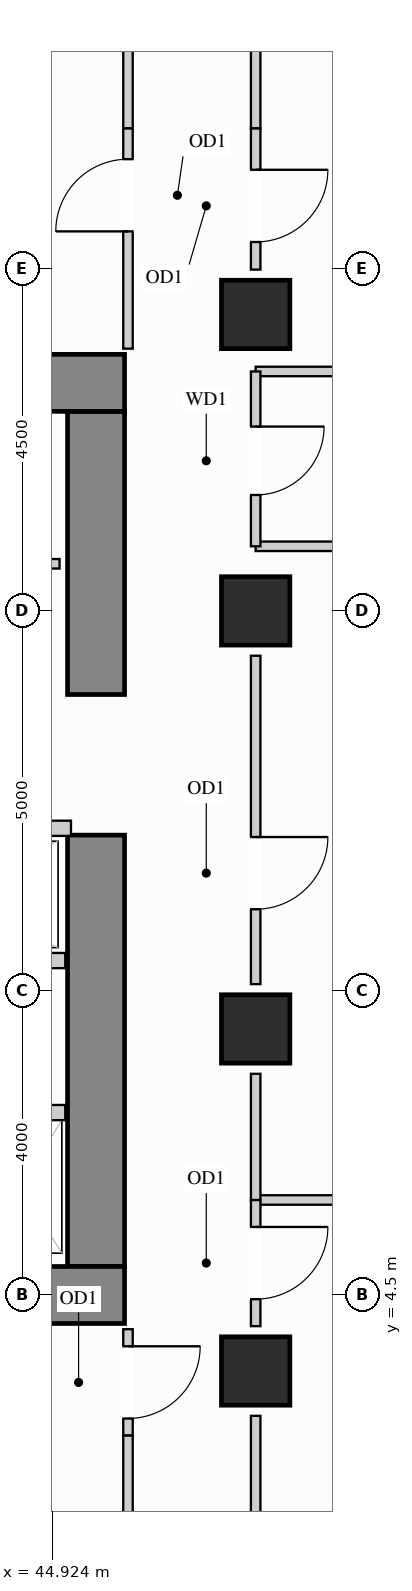
"""IFC4 building model, lengths in metres.
Left out: names, types, materials, properties, quantities, classifications, styles, units other than length and angle.
Written with IfcOpenShell. Run it as: python <this file> out.ifc"""

import sys

from ifc_helpers import new_model, si_unit, direction, frame, frame_2d, origin, origin_2d, place, context, subcontext, project, spatial, rectangle, extrude, source, transform, mapped, element, fill, save


model = new_model("IFC4")
c1 = context("Model", 3, precision=1e-05, world=origin(), true_north=direction((0.0, 1.0)))
c2 = subcontext(c1, "Body", "Model", "MODEL_VIEW")
j1 = project(units=[si_unit("LENGTHUNIT", "METRE"), si_unit("PLANEANGLEUNIT", "RADIAN")], contexts=[c1])
p1 = place(None, origin())
s1 = spatial("IfcSite", under=j1, at=p1, CompositionType="ELEMENT")
p2 = place(p1, origin())
s2 = spatial("IfcBuilding", under=s1, at=p2, CompositionType="ELEMENT")
p3 = place(p2, frame((0.0, 0.0, 135.0)))
s3 = spatial("IfcBuildingStorey", under=s2, at=p3, CompositionType="ELEMENT", Elevation=135.0)
m1 = source(origin(), c2, "Body", "SweptSolid", [
    extrude(rectangle(XDim=0.9, YDim=0.9, at=origin_2d()), origin(), (0.0, 0.0, 1.0), 3.32),
])
for number, where, z_axis, x_axis in (
    (1, (47.6, 13.5, 0.0), (0.0, 0.0, 1.0), (1.0, 0.0, 0.0)),
    (2, (47.6, 3.5, 0.0), (0.0, 0.0, 1.0), (1.0, 0.0, 0.0)),
    (3, (47.6, 8.0, 0.0), (0.0, 0.0, 1.0), (1.0, 0.0, 0.0)),
    (4, (47.6, 17.4, 0.0), (0.0, 0.0, 1.0), (1.0, 0.0, 0.0)),
):
    element("IfcColumn", number, at=place(p3, frame(where, z_axis=z_axis, x_axis=x_axis)), inside=s3, PredefinedType="COLUMN", context=c2, shape_type="MappedRepresentation", body=[
        mapped(m1, transform((0.0, 0.0, 0.0), x_axis=(1.0, 0.0, 0.0), y_axis=(0.0, 1.0, 0.0), z_axis=(0.0, 0.0, 1.0))),
    ])
m2 = source(origin(), c2, "Body", "SweptSolid", [
    extrude(rectangle(XDim=5.675, YDim=0.75, at=frame_2d((2.837, 0.0))), origin(), (0.0, 0.0, 1.0), 3.32),
])
p4 = place(p3, frame((45.5, 4.875, 0.0), z_axis=(0.0, 0.0, 1.0), x_axis=(0.0, 1.0, 0.0)))
e5 = element("IfcWall", 5, at=p4, inside=s3, PredefinedType="SHEAR", context=c2, shape_type="MappedRepresentation", body=[
    mapped(m2, transform((0.0, 0.0, 0.0), x_axis=(1.0, 0.0, 0.0), y_axis=(0.0, 1.0, 0.0), z_axis=(0.0, 0.0, 1.0))),
])
m3 = source(origin(), c2, "Body", "SweptSolid", [
    extrude(rectangle(XDim=3.725, YDim=0.75, at=frame_2d((1.863, 0.0))), origin(), (0.0, 0.0, 1.0), 3.32),
])
p5 = place(p3, frame((45.5, 12.4, 0.0), z_axis=(0.0, 0.0, 1.0), x_axis=(0.0, 1.0, 0.0)))
e6 = element("IfcWall", 6, at=p5, inside=s3, PredefinedType="SHEAR", context=c2, shape_type="MappedRepresentation", body=[
    mapped(m3, transform((0.0, 0.0, 0.0), x_axis=(1.0, 0.0, 0.0), y_axis=(0.0, 1.0, 0.0), z_axis=(0.0, 0.0, 1.0))),
])
m4 = source(origin(), c2, "Body", "SweptSolid", [
    extrude(rectangle(XDim=10.25, YDim=0.75, at=frame_2d((5.125, 0.0))), origin(), (0.0, 0.0, 1.0), 3.32),
])
for number, where, z_axis, x_axis in (
    (7, (35.625, 16.5, 0.0), (0.0, 0.0, 1.0), (1.0, 0.0, 0.0)),
    (8, (35.625, 4.5, 0.0), (0.0, 0.0, 1.0), (1.0, 0.0, 0.0)),
):
    element("IfcWall", number, at=place(p3, frame(where, z_axis=z_axis, x_axis=x_axis)), inside=s3, PredefinedType="SHEAR", context=c2, shape_type="MappedRepresentation", body=[
        mapped(m4, transform((0.0, 0.0, 0.0), x_axis=(1.0, 0.0, 0.0), y_axis=(0.0, 1.0, 0.0), z_axis=(0.0, 0.0, 1.0))),
    ])
p6 = place(p3, frame((36.5, 14.12, 0.0), z_axis=(0.0, 0.0, 1.0), x_axis=(1.0, 0.0, 0.0)))
e9 = element("IfcWall", 9, at=p6, inside=s3, PredefinedType="PARTITIONING", context=c2, shape_type="SweptSolid", body=[
    extrude(rectangle(XDim=8.52, YDim=0.125, at=frame_2d((4.26, 0.0))), origin(), (0.0, 0.0, 1.0), 3.305),
])
p7 = place(p6, frame((3.785, 0.0, 0.0)))
e10 = element("IfcOpeningElement", 10, at=p7, cuts=e9, PredefinedType="OPENING", context=c2, shape_type="SweptSolid", body=[
    extrude(rectangle(XDim=0.95, YDim=2.15, at=frame_2d((0.475, 1.075))), frame((0.0, 0.073, 0.0), z_axis=(0.0, -1.0, 0.0), x_axis=(1.0, 0.0, 0.0)), (0.0, 0.0, 1.0), 0.145),
])
m5 = source(origin(), c2, "Body", "SweptSolid", [
    extrude(rectangle(XDim=8.048, YDim=0.125, at=frame_2d((4.024, 0.0))), origin(), (0.0, 0.0, 1.0), 3.305),
])
p8 = place(p3, frame((47.6, 14.35, 0.0), z_axis=(0.0, 0.0, 1.0), x_axis=(1.0, 0.0, 0.0)))
e11 = element("IfcWall", 11, at=p8, inside=s3, PredefinedType="PARTITIONING", context=c2, shape_type="MappedRepresentation", body=[
    mapped(m5, transform((0.0, 0.0, 0.0), x_axis=(1.0, 0.0, 0.0), y_axis=(0.0, 1.0, 0.0), z_axis=(0.0, 0.0, 1.0))),
])
m6 = source(origin(), c2, "Body", "SweptSolid", [
    extrude(rectangle(XDim=8.048, YDim=0.125, at=frame_2d((4.024, 0.0))), origin(), (0.0, 0.0, 1.0), 2.617),
])
p9 = place(p3, frame((47.6, 16.65, 0.0), z_axis=(0.0, 0.0, 1.0), x_axis=(1.0, 0.0, 0.0)))
e12 = element("IfcWall", 12, at=p9, inside=s3, PredefinedType="PARTITIONING", context=c2, shape_type="MappedRepresentation", body=[
    mapped(m6, transform((0.0, 0.0, 0.0), x_axis=(1.0, 0.0, 0.0), y_axis=(0.0, 1.0, 0.0), z_axis=(0.0, 0.0, 1.0))),
])
p10 = place(p3, frame((47.6, 5.75, 0.0), z_axis=(0.0, 0.0, 1.0), x_axis=(1.0, 0.0, 0.0)))
e13 = element("IfcWall", 13, at=p10, inside=s3, PredefinedType="PARTITIONING", context=c2, shape_type="MappedRepresentation", body=[
    mapped(m5, transform((0.0, 0.0, 0.0), x_axis=(1.0, 0.0, 0.0), y_axis=(0.0, 1.0, 0.0), z_axis=(0.0, 0.0, 1.0))),
])
p11 = place(p3, frame((47.6, 4.09, 0.0), z_axis=(0.0, 0.0, 1.0), x_axis=(0.0, 1.0, 0.0)))
e14 = element("IfcWall", 14, at=p11, inside=s3, PredefinedType="PARTITIONING", context=c2, shape_type="SweptSolid", body=[
    extrude(rectangle(XDim=1.66, YDim=0.125, at=frame_2d((0.83, 0.0))), origin(), (0.0, 0.0, 1.0), 2.617),
])
p12 = place(p11, frame((0.355, 0.0, 0.0)))
e15 = element("IfcOpeningElement", 15, at=p12, cuts=e14, PredefinedType="OPENING", context=c2, shape_type="SweptSolid", body=[
    extrude(rectangle(XDim=0.95, YDim=2.15, at=frame_2d((0.475, 1.075))), frame((0.0, 0.073, 0.0), z_axis=(0.0, -1.0, 0.0), x_axis=(1.0, 0.0, 0.0)), (0.0, 0.0, 1.0), 0.145),
])
m7 = source(origin(), c2, "Body", "SweptSolid", [
    extrude(rectangle(XDim=1.72, YDim=0.125, at=frame_2d((0.86, 0.0))), origin(), (0.0, 0.0, 1.0), 2.617),
])
p13 = place(p3, frame((47.6, 1.19, 0.0), z_axis=(0.0, 0.0, 1.0), x_axis=(0.0, 1.0, 0.0)))
e16 = element("IfcWall", 16, at=p13, inside=s3, PredefinedType="PARTITIONING", context=c2, shape_type="MappedRepresentation", body=[
    mapped(m7, transform((0.0, 0.0, 0.0), x_axis=(1.0, 0.0, 0.0), y_axis=(0.0, 1.0, 0.0), z_axis=(0.0, 0.0, 1.0))),
])
m8 = source(origin(), c2, "Body", "SweptSolid", [
    extrude(rectangle(XDim=1.66, YDim=0.125, at=frame_2d((0.83, 0.0))), origin(), (0.0, 0.0, 1.0), 2.617),
])
p14 = place(p3, frame((47.6, 5.75, 0.0), z_axis=(0.0, 0.0, 1.0), x_axis=(0.0, 1.0, 0.0)))
e17 = element("IfcWall", 17, at=p14, inside=s3, PredefinedType="PARTITIONING", context=c2, shape_type="MappedRepresentation", body=[
    mapped(m8, transform((0.0, 0.0, 0.0), x_axis=(1.0, 0.0, 0.0), y_axis=(0.0, 1.0, 0.0), z_axis=(0.0, 0.0, 1.0))),
])
p15 = place(p3, frame((47.6, 8.59, 0.0), z_axis=(0.0, 0.0, 1.0), x_axis=(0.0, 1.0, 0.0)))
e18 = element("IfcWall", 18, at=p15, inside=s3, PredefinedType="PARTITIONING", context=c2, shape_type="SweptSolid", body=[
    extrude(rectangle(XDim=4.32, YDim=0.125, at=frame_2d((2.16, 0.0))), origin(), (0.0, 0.0, 1.0), 2.617),
])
p16 = place(p15, frame((0.985, 0.0, 0.0)))
e19 = element("IfcOpeningElement", 19, at=p16, cuts=e18, PredefinedType="OPENING", context=c2, shape_type="SweptSolid", body=[
    extrude(rectangle(XDim=0.95, YDim=2.15, at=frame_2d((0.475, 1.075))), frame((0.0, 0.073, 0.0), z_axis=(0.0, -1.0, 0.0), x_axis=(1.0, 0.0, 0.0)), (0.0, 0.0, 1.0), 0.145),
])
p17 = place(p3, frame((47.6, 17.99, 0.0), z_axis=(0.0, 0.0, 1.0), x_axis=(0.0, 1.0, 0.0)))
e20 = element("IfcWall", 20, at=p17, inside=s3, PredefinedType="PARTITIONING", context=c2, shape_type="SweptSolid", body=[
    extrude(rectangle(XDim=1.86, YDim=0.125, at=frame_2d((0.93, 0.0))), origin(), (0.0, 0.0, 1.0), 2.617),
])
p18 = place(p17, frame((0.363, 0.0, 0.0)))
e21 = element("IfcOpeningElement", 21, at=p18, cuts=e20, PredefinedType="OPENING", context=c2, shape_type="SweptSolid", body=[
    extrude(rectangle(XDim=0.95, YDim=2.15, at=frame_2d((0.475, 1.075))), frame((0.0, 0.073, 0.0), z_axis=(0.0, -1.0, 0.0), x_axis=(1.0, 0.0, 0.0)), (0.0, 0.0, 1.0), 0.145),
])
m9 = source(origin(), c2, "Body", "SweptSolid", [
    extrude(rectangle(XDim=1.46, YDim=0.125, at=frame_2d((0.73, 0.0))), origin(), (0.0, 0.0, 1.0), 2.617),
])
p19 = place(p3, frame((47.6, 19.85, 0.0), z_axis=(0.0, 0.0, 1.0), x_axis=(0.0, 1.0, 0.0)))
e22 = element("IfcWall", 22, at=p19, inside=s3, PredefinedType="PARTITIONING", context=c2, shape_type="MappedRepresentation", body=[
    mapped(m9, transform((0.0, 0.0, 0.0), x_axis=(1.0, 0.0, 0.0), y_axis=(0.0, 1.0, 0.0), z_axis=(0.0, 0.0, 1.0))),
])
p20 = place(p3, frame((47.6, 14.35, 0.0), z_axis=(0.0, 0.0, 1.0), x_axis=(0.0, 1.0, 0.0)))
e23 = element("IfcWall", 23, at=p20, inside=s3, PredefinedType="PARTITIONING", context=c2, shape_type="SweptSolid", body=[
    extrude(rectangle(XDim=2.3, YDim=0.125, at=frame_2d((1.15, 0.0))), origin(), (0.0, 0.0, 1.0), 2.617),
])
p21 = place(p20, frame((0.675, 0.0, 0.0)))
e24 = element("IfcOpeningElement", 24, at=p21, cuts=e23, PredefinedType="OPENING", context=c2, shape_type="SweptSolid", body=[
    extrude(rectangle(XDim=0.9, YDim=2.15, at=frame_2d((0.45, 1.075))), frame((0.0, 0.073, 0.0), z_axis=(0.0, -1.0, 0.0), x_axis=(1.0, 0.0, 0.0)), (0.0, 0.0, 1.0), 0.145),
])
p22 = place(p3, frame((45.92, 16.95, 0.0), z_axis=(0.0, 0.0, 1.0), x_axis=(0.0, 1.0, 0.0)))
e25 = element("IfcWall", 25, at=p22, inside=s3, PredefinedType="PARTITIONING", context=c2, shape_type="SweptSolid", body=[
    extrude(rectangle(XDim=2.9, YDim=0.125, at=frame_2d((1.45, 0.0))), origin(), (0.0, 0.0, 1.0), 3.305),
])
p23 = place(p22, frame((1.543, 0.0, 0.0)))
e26 = element("IfcOpeningElement", 26, at=p23, cuts=e25, PredefinedType="OPENING", context=c2, shape_type="SweptSolid", body=[
    extrude(rectangle(XDim=0.95, YDim=2.15, at=frame_2d((0.475, 1.075))), frame((0.0, 0.073, 0.0), z_axis=(0.0, -1.0, 0.0), x_axis=(1.0, 0.0, 0.0)), (0.0, 0.0, 1.0), 0.145),
])
m10 = source(origin(), c2, "Body", "SweptSolid", [
    extrude(rectangle(XDim=2.298, YDim=0.125, at=frame_2d((1.149, 0.0))), origin(), (0.0, 0.0, 1.0), 3.305),
])
p24 = place(p3, frame((45.92, 19.85, 0.0), z_axis=(0.0, 0.0, 1.0), x_axis=(0.0, 1.0, 0.0)))
e27 = element("IfcWall", 27, at=p24, inside=s3, PredefinedType="PARTITIONING", context=c2, shape_type="MappedRepresentation", body=[
    mapped(m10, transform((0.0, 0.0, 0.0), x_axis=(1.0, 0.0, 0.0), y_axis=(0.0, 1.0, 0.0), z_axis=(0.0, 0.0, 1.0))),
])
p25 = place(p3, frame((45.92, 2.65, 0.0), z_axis=(0.0, 0.0, 1.0), x_axis=(0.0, 1.0, 0.0)))
e28 = element("IfcWall", 28, at=p25, inside=s3, PredefinedType="PARTITIONING", context=c2, shape_type="SweptSolid", body=[
    extrude(rectangle(XDim=1.4, YDim=0.125, at=frame_2d((0.7, 0.0))), origin(), (0.0, 0.0, 1.0), 3.305),
])
p26 = place(p25, frame((0.225, 0.0, 0.0)))
e29 = element("IfcOpeningElement", 29, at=p26, cuts=e28, PredefinedType="OPENING", context=c2, shape_type="SweptSolid", body=[
    extrude(rectangle(XDim=0.95, YDim=2.15, at=frame_2d((0.475, 1.075))), frame((0.0, 0.073, 0.0), z_axis=(0.0, -1.0, 0.0), x_axis=(1.0, 0.0, 0.0)), (0.0, 0.0, 1.0), 0.145),
])
p27 = place(p3, frame((45.92, 0.352, 0.0), z_axis=(0.0, 0.0, 1.0), x_axis=(0.0, 1.0, 0.0)))
e30 = element("IfcWall", 30, at=p27, inside=s3, PredefinedType="PARTITIONING", context=c2, shape_type="MappedRepresentation", body=[
    mapped(m10, transform((0.0, 0.0, 0.0), x_axis=(1.0, 0.0, 0.0), y_axis=(0.0, 1.0, 0.0), z_axis=(0.0, 0.0, 1.0))),
])
m11 = source(origin(), c2, "Body", "SweptSolid", [
    extrude(rectangle(XDim=1.245, YDim=0.2, at=frame_2d((0.623, 0.0))), origin(), (0.0, 0.0, 1.0), 3.305),
])
p28 = place(p3, frame((43.85, 6.9, 0.0), z_axis=(0.0, 0.0, 1.0), x_axis=(1.0, 0.0, 0.0)))
e31 = element("IfcWall", 31, at=p28, inside=s3, PredefinedType="PARTITIONING", context=c2, shape_type="MappedRepresentation", body=[
    mapped(m11, transform((0.0, 0.0, 0.0), x_axis=(1.0, 0.0, 0.0), y_axis=(0.0, 1.0, 0.0), z_axis=(0.0, 0.0, 1.0))),
])
m12 = source(origin(), c2, "Body", "SweptSolid", [
    extrude(rectangle(XDim=3.49, YDim=0.2, at=frame_2d((1.745, 0.0))), origin(), (0.0, 0.0, 1.0), 3.305),
])
p29 = place(p3, frame((41.68, 10.64, 0.0), z_axis=(0.0, 0.0, 1.0), x_axis=(1.0, 0.0, 0.0)))
e32 = element("IfcWall", 32, at=p29, inside=s3, PredefinedType="PARTITIONING", context=c2, shape_type="MappedRepresentation", body=[
    mapped(m12, transform((0.0, 0.0, 0.0), x_axis=(1.0, 0.0, 0.0), y_axis=(0.0, 1.0, 0.0), z_axis=(0.0, 0.0, 1.0))),
])
m13 = source(origin(), c2, "Body", "SweptSolid", [
    extrude(rectangle(XDim=3.415, YDim=0.2, at=frame_2d((1.708, 0.0))), origin(), (0.0, 0.0, 1.0), 3.305),
])
p30 = place(p3, frame((41.68, 8.9, 0.0), z_axis=(0.0, 0.0, 1.0), x_axis=(1.0, 0.0, 0.0)))
e33 = element("IfcWall", 33, at=p30, inside=s3, PredefinedType="PARTITIONING", context=c2, shape_type="MappedRepresentation", body=[
    mapped(m13, transform((0.0, 0.0, 0.0), x_axis=(1.0, 0.0, 0.0), y_axis=(0.0, 1.0, 0.0), z_axis=(0.0, 0.0, 1.0))),
])
m14 = source(origin(), c2, "Body", "SweptSolid", [
    extrude(rectangle(XDim=0.95, YDim=2.15, at=frame_2d((0.475, 1.075))), frame((0.0, 0.025, 0.0), z_axis=(0.0, -1.0, 0.0), x_axis=(1.0, 0.0, 0.0)), (0.0, 0.0, 1.0), 0.05),
])
p31 = place(p23, origin())
e34 = element("IfcDoor", 34, at=p31, inside=s3, OperationType="SINGLE_SWING_LEFT", PredefinedType="DOOR", context=c2, shape_type="MappedRepresentation", body=[
    mapped(m14, transform((0.0, 0.0, 0.0), x_axis=(1.0, 0.0, 0.0), y_axis=(0.0, 1.0, 0.0), z_axis=(0.0, 0.0, 1.0))),
])
fill(e26, e34)
p32 = place(p26, origin())
e35 = element("IfcDoor", 35, at=p32, inside=s3, OperationType="SINGLE_SWING_RIGHT", PredefinedType="DOOR", context=c2, shape_type="MappedRepresentation", body=[
    mapped(m14, transform((0.0, 0.0, 0.0), x_axis=(1.0, 0.0, 0.0), y_axis=(0.0, 1.0, 0.0), z_axis=(0.0, 0.0, 1.0))),
])
fill(e29, e35)
p33 = place(p12, origin())
e36 = element("IfcDoor", 36, at=p33, inside=s3, OperationType="SINGLE_SWING_RIGHT", PredefinedType="DOOR", context=c2, shape_type="MappedRepresentation", body=[
    mapped(m14, transform((0.0, 0.0, 0.0), x_axis=(1.0, 0.0, 0.0), y_axis=(0.0, 1.0, 0.0), z_axis=(0.0, 0.0, 1.0))),
])
fill(e15, e36)
p34 = place(p16, origin())
e37 = element("IfcDoor", 37, at=p34, inside=s3, OperationType="SINGLE_SWING_RIGHT", PredefinedType="DOOR", context=c2, shape_type="MappedRepresentation", body=[
    mapped(m14, transform((0.0, 0.0, 0.0), x_axis=(1.0, 0.0, 0.0), y_axis=(0.0, 1.0, 0.0), z_axis=(0.0, 0.0, 1.0))),
])
fill(e19, e37)
p35 = place(p18, origin())
e38 = element("IfcDoor", 38, at=p35, inside=s3, OperationType="SINGLE_SWING_RIGHT", PredefinedType="DOOR", context=c2, shape_type="MappedRepresentation", body=[
    mapped(m14, transform((0.0, 0.0, 0.0), x_axis=(1.0, 0.0, 0.0), y_axis=(0.0, 1.0, 0.0), z_axis=(0.0, 0.0, 1.0))),
])
fill(e21, e38)
m15 = source(origin(), c2, "Body", "SweptSolid", [
    extrude(rectangle(XDim=0.9, YDim=2.15, at=frame_2d((0.45, 1.075))), frame((0.0, 0.025, 0.0), z_axis=(0.0, -1.0, 0.0), x_axis=(1.0, 0.0, 0.0)), (0.0, 0.0, 1.0), 0.05),
])
p36 = place(p21, origin())
e39 = element("IfcDoor", 39, at=p36, inside=s3, OperationType="SINGLE_SWING_RIGHT", PredefinedType="DOOR", context=c2, shape_type="MappedRepresentation", body=[
    mapped(m15, transform((0.0, 0.0, 0.0), x_axis=(1.0, 0.0, 0.0), y_axis=(0.0, 1.0, 0.0), z_axis=(0.0, 0.0, 1.0))),
])
fill(e24, e39)
save(model, sys.argv[1])
